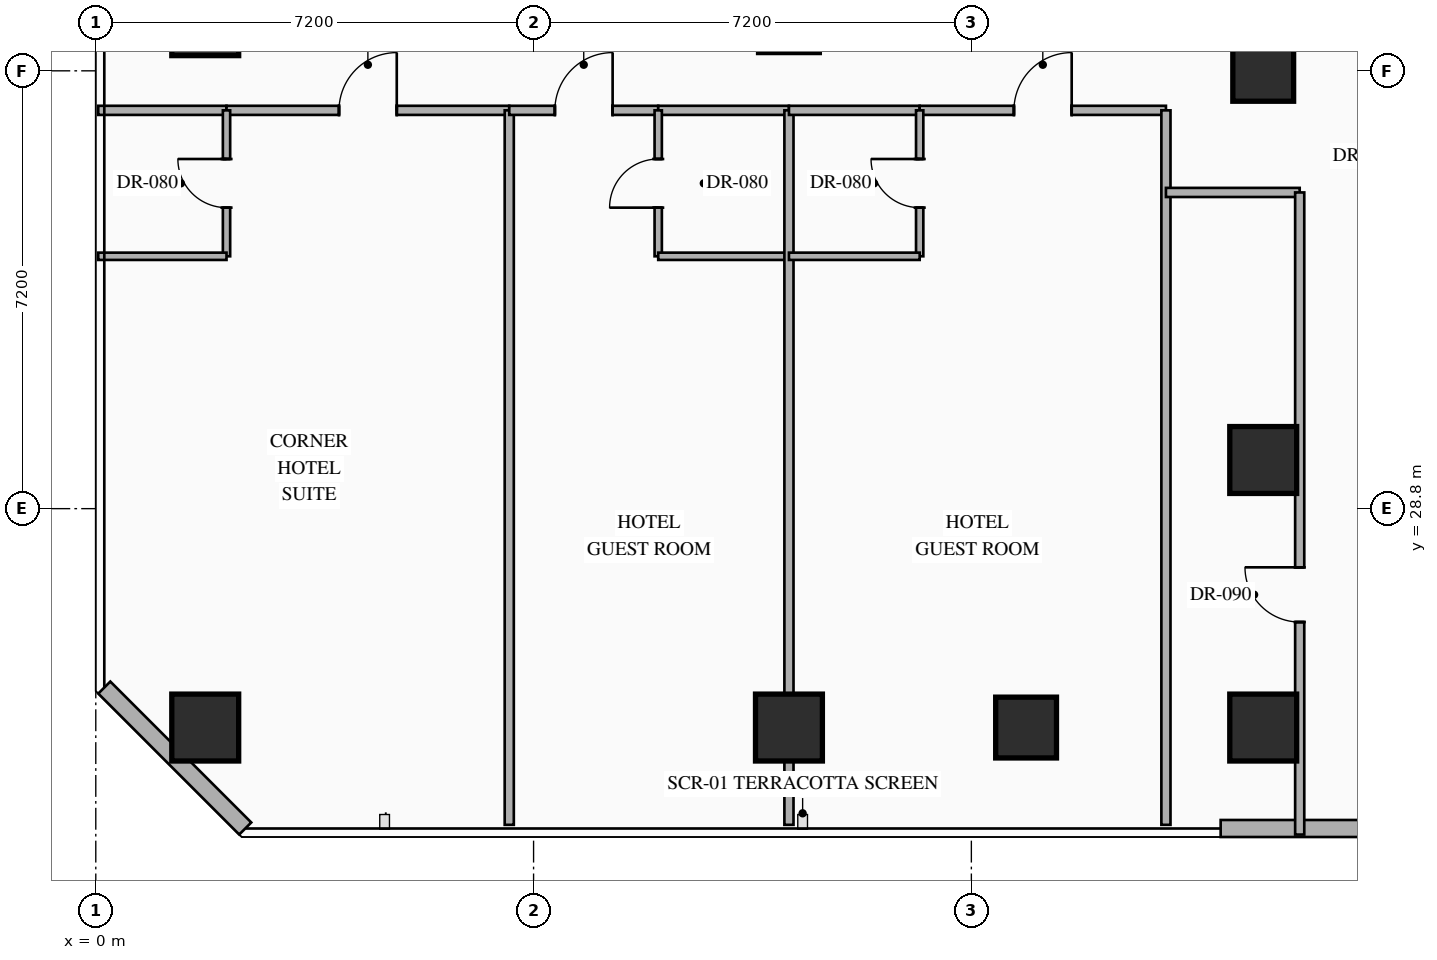
"""IFC4 building model, lengths in metres.
Left out: names, types, materials, properties, quantities, classifications, styles, units other than length and angle.
Written with IfcOpenShell. Run it as: python <this file> out.ifc"""

import sys

from ifc_helpers import new_model, si_unit, direction, frame, frame_2d, origin, origin_2d, place, context, subcontext, project, spatial, rectangle, hollow_rectangle, extrude, element, fill, save


model = new_model("IFC4")
c1 = context("Model", 3, precision=1e-05, world=origin(), true_north=direction((0.0, 1.0)))
c2 = subcontext(c1, "Body", "Model", "MODEL_VIEW")
j1 = project(units=[si_unit("LENGTHUNIT", "METRE"), si_unit("PLANEANGLEUNIT", "RADIAN")], contexts=[c1])
p1 = place(None, origin())
s1 = spatial("IfcSite", under=j1, at=p1, CompositionType="ELEMENT")
p2 = place(p1, origin())
s2 = spatial("IfcBuilding", under=s1, at=p2, CompositionType="ELEMENT")
p3 = place(p2, frame((0.0, 0.0, 36.6)))
s3 = spatial("IfcBuildingStorey", under=s2, at=p3, CompositionType="ELEMENT", Elevation=36.6)
for number, where, z_axis, x_axis in (
    (1, (1.8, 25.2, 0.0), (0.0, 0.0, 1.0), (1.0, 0.0, 0.0)),
    (2, (1.8, 36.8, 0.0), (0.0, 0.0, 1.0), (1.0, 0.0, 0.0)),
    (3, (11.4, 25.2, 0.0), (0.0, 0.0, 1.0), (1.0, 0.0, 0.0)),
    (4, (19.2, 25.2, 0.0), (0.0, 0.0, 1.0), (1.0, 0.0, 0.0)),
    (5, (19.2, 29.6, 0.0), (0.0, 0.0, 1.0), (1.0, 0.0, 0.0)),
):
    element("IfcColumn", number, at=place(p3, frame(where, z_axis=z_axis, x_axis=x_axis)), inside=s3, PredefinedType="COLUMN", context=c2, shape_type="SweptSolid", body=[
        extrude(hollow_rectangle(XDim=1.1, YDim=1.1, WallThickness=0.04, at=origin_2d()), origin(), (0.0, 0.0, 1.0), 3.35),
    ])
for number, where, z_axis, x_axis in (
    (6, (19.2, 36.0, 0.0), (0.0, 0.0, 1.0), (1.0, 0.0, 0.0)),
    (7, (15.3, 25.2, 0.0), (0.0, 0.0, 1.0), (1.0, 0.0, 0.0)),
):
    element("IfcColumn", number, at=place(p3, frame(where, z_axis=z_axis, x_axis=x_axis)), inside=s3, PredefinedType="COLUMN", context=c2, shape_type="SweptSolid", body=[
        extrude(hollow_rectangle(XDim=1.0, YDim=1.0, WallThickness=0.038, at=origin_2d()), origin(), (0.0, 0.0, 1.0), 3.35),
    ])
p4 = place(p3, frame((25.247, 23.54, 0.0), z_axis=(0.0, 0.0, 1.0), x_axis=(-1.0, 0.0, 0.0)))
e8 = element("IfcWall", 8, at=p4, inside=s3, PredefinedType="STANDARD", context=c2, shape_type="SweptSolid", body=[
    extrude(rectangle(XDim=6.747, YDim=0.28, at=frame_2d((3.374, 0.0))), origin(), (0.0, 0.0, 1.0), 3.13),
])
p5 = place(p3, frame((2.458, 23.54, 0.0), z_axis=(0.0, 0.0, 1.0), x_axis=(-0.707144017911, 0.707069542501, 0.0)))
e9 = element("IfcWall", 9, at=p5, inside=s3, PredefinedType="STANDARD", context=c2, shape_type="SweptSolid", body=[
    extrude(rectangle(XDim=3.278, YDim=0.28, at=frame_2d((1.639, 0.0))), origin(), (0.0, 0.0, 1.0), 3.13),
])
p6 = place(p3, frame((0.04, 35.35, 0.0), z_axis=(0.0, 0.0, 1.0), x_axis=(1.0, 0.0, 0.0)))
e10 = element("IfcWall", 10, at=p6, inside=s3, PredefinedType="PARTITIONING", context=c2, shape_type="SweptSolid", body=[
    extrude(rectangle(XDim=2.11, YDim=0.15, at=frame_2d((1.055, 0.0))), origin(), (0.0, 0.0, 1.0), 3.13),
])
p7 = place(p3, frame((2.15, 35.35, 0.0), z_axis=(0.0, 0.0, 1.0), x_axis=(1.0, 0.0, 0.0)))
e11 = element("IfcWall", 11, at=p7, inside=s3, PredefinedType="PARTITIONING", context=c2, shape_type="SweptSolid", body=[
    extrude(rectangle(XDim=4.65, YDim=0.15, at=frame_2d((2.325, 0.0))), origin(), (0.0, 0.0, 1.0), 3.13),
])
p8 = place(p7, frame((1.85, 0.0, 0.0)))
e12 = element("IfcOpeningElement", 12, at=p8, cuts=e11, PredefinedType="OPENING", context=c2, shape_type="SweptSolid", body=[
    extrude(rectangle(XDim=0.95, YDim=2.15, at=frame_2d((0.475, 1.075))), frame((0.0, 0.085, 0.0), z_axis=(0.0, -1.0, 0.0), x_axis=(1.0, 0.0, 0.0)), (0.0, 0.0, 1.0), 0.17),
])
p9 = place(p3, frame((2.15, 32.95, 0.0), z_axis=(0.0, 0.0, 1.0), x_axis=(0.0, 1.0, 0.0)))
e13 = element("IfcWall", 13, at=p9, inside=s3, PredefinedType="PARTITIONING", context=c2, shape_type="SweptSolid", body=[
    extrude(rectangle(XDim=2.4, YDim=0.12, at=frame_2d((1.2, 0.0))), origin(), (0.0, 0.0, 1.0), 3.13),
])
p10 = place(p9, frame((0.8, 0.0, 0.0)))
e14 = element("IfcOpeningElement", 14, at=p10, cuts=e13, PredefinedType="OPENING", context=c2, shape_type="SweptSolid", body=[
    extrude(rectangle(XDim=0.8, YDim=2.06, at=frame_2d((0.4, 1.03))), frame((0.0, 0.07, 0.0), z_axis=(0.0, -1.0, 0.0), x_axis=(1.0, 0.0, 0.0)), (0.0, 0.0, 1.0), 0.14),
])
p11 = place(p3, frame((0.04, 32.95, 0.0), z_axis=(0.0, 0.0, 1.0), x_axis=(1.0, 0.0, 0.0)))
e15 = element("IfcWall", 15, at=p11, inside=s3, PredefinedType="PARTITIONING", context=c2, shape_type="SweptSolid", body=[
    extrude(rectangle(XDim=2.11, YDim=0.12, at=frame_2d((1.055, 0.0))), origin(), (0.0, 0.0, 1.0), 3.13),
])
p12 = place(p3, frame((6.8, 23.6, 0.0), z_axis=(0.0, 0.0, 1.0), x_axis=(0.0, 1.0, 0.0)))
e16 = element("IfcWall", 16, at=p12, inside=s3, PredefinedType="PARTITIONING", context=c2, shape_type="SweptSolid", body=[
    extrude(rectangle(XDim=11.75, YDim=0.15, at=frame_2d((5.875, 0.0))), origin(), (0.0, 0.0, 1.0), 3.13),
])
p13 = place(p3, frame((6.8, 35.35, 0.0), z_axis=(0.0, 0.0, 1.0), x_axis=(1.0, 0.0, 0.0)))
e17 = element("IfcWall", 17, at=p13, inside=s3, PredefinedType="PARTITIONING", context=c2, shape_type="SweptSolid", body=[
    extrude(rectangle(XDim=2.45, YDim=0.15, at=frame_2d((1.225, 0.0))), origin(), (0.0, 0.0, 1.0), 3.13),
])
p14 = place(p13, frame((0.75, 0.0, 0.0)))
e18 = element("IfcOpeningElement", 18, at=p14, cuts=e17, PredefinedType="OPENING", context=c2, shape_type="SweptSolid", body=[
    extrude(rectangle(XDim=0.95, YDim=2.15, at=frame_2d((0.475, 1.075))), frame((0.0, 0.085, 0.0), z_axis=(0.0, -1.0, 0.0), x_axis=(1.0, 0.0, 0.0)), (0.0, 0.0, 1.0), 0.17),
])
p15 = place(p3, frame((9.25, 35.35, 0.0), z_axis=(0.0, 0.0, 1.0), x_axis=(1.0, 0.0, 0.0)))
e19 = element("IfcWall", 19, at=p15, inside=s3, PredefinedType="PARTITIONING", context=c2, shape_type="SweptSolid", body=[
    extrude(rectangle(XDim=2.15, YDim=0.15, at=frame_2d((1.075, 0.0))), origin(), (0.0, 0.0, 1.0), 3.13),
])
p16 = place(p3, frame((9.25, 32.95, 0.0), z_axis=(0.0, 0.0, 1.0), x_axis=(0.0, 1.0, 0.0)))
e20 = element("IfcWall", 20, at=p16, inside=s3, PredefinedType="PARTITIONING", context=c2, shape_type="SweptSolid", body=[
    extrude(rectangle(XDim=2.4, YDim=0.12, at=frame_2d((1.2, 0.0))), origin(), (0.0, 0.0, 1.0), 3.13),
])
p17 = place(p16, frame((0.8, 0.0, 0.0)))
e21 = element("IfcOpeningElement", 21, at=p17, cuts=e20, PredefinedType="OPENING", context=c2, shape_type="SweptSolid", body=[
    extrude(rectangle(XDim=0.8, YDim=2.06, at=frame_2d((0.4, 1.03))), frame((0.0, 0.07, 0.0), z_axis=(0.0, -1.0, 0.0), x_axis=(1.0, 0.0, 0.0)), (0.0, 0.0, 1.0), 0.14),
])
p18 = place(p3, frame((9.25, 32.95, 0.0), z_axis=(0.0, 0.0, 1.0), x_axis=(1.0, 0.0, 0.0)))
e22 = element("IfcWall", 22, at=p18, inside=s3, PredefinedType="PARTITIONING", context=c2, shape_type="SweptSolid", body=[
    extrude(rectangle(XDim=2.15, YDim=0.12, at=frame_2d((1.075, 0.0))), origin(), (0.0, 0.0, 1.0), 3.13),
])
p19 = place(p3, frame((11.4, 23.6, 0.0), z_axis=(0.0, 0.0, 1.0), x_axis=(0.0, 1.0, 0.0)))
e23 = element("IfcWall", 23, at=p19, inside=s3, PredefinedType="PARTITIONING", context=c2, shape_type="SweptSolid", body=[
    extrude(rectangle(XDim=11.75, YDim=0.15, at=frame_2d((5.875, 0.0))), origin(), (0.0, 0.0, 1.0), 2.425),
])
p20 = place(p3, frame((11.4, 35.35, 0.0), z_axis=(0.0, 0.0, 1.0), x_axis=(1.0, 0.0, 0.0)))
e24 = element("IfcWall", 24, at=p20, inside=s3, PredefinedType="PARTITIONING", context=c2, shape_type="SweptSolid", body=[
    extrude(rectangle(XDim=2.15, YDim=0.15, at=frame_2d((1.075, 0.0))), origin(), (0.0, 0.0, 1.0), 3.13),
])
p21 = place(p3, frame((13.55, 35.35, 0.0), z_axis=(0.0, 0.0, 1.0), x_axis=(1.0, 0.0, 0.0)))
e25 = element("IfcWall", 25, at=p21, inside=s3, PredefinedType="PARTITIONING", context=c2, shape_type="SweptSolid", body=[
    extrude(rectangle(XDim=4.05, YDim=0.15, at=frame_2d((2.025, 0.0))), origin(), (0.0, 0.0, 1.0), 3.13),
])
p22 = place(p21, frame((1.55, 0.0, 0.0)))
e26 = element("IfcOpeningElement", 26, at=p22, cuts=e25, PredefinedType="OPENING", context=c2, shape_type="SweptSolid", body=[
    extrude(rectangle(XDim=0.95, YDim=2.15, at=frame_2d((0.475, 1.075))), frame((0.0, 0.085, 0.0), z_axis=(0.0, -1.0, 0.0), x_axis=(1.0, 0.0, 0.0)), (0.0, 0.0, 1.0), 0.17),
])
p23 = place(p3, frame((13.55, 32.95, 0.0), z_axis=(0.0, 0.0, 1.0), x_axis=(0.0, 1.0, 0.0)))
e27 = element("IfcWall", 27, at=p23, inside=s3, PredefinedType="PARTITIONING", context=c2, shape_type="SweptSolid", body=[
    extrude(rectangle(XDim=2.4, YDim=0.12, at=frame_2d((1.2, 0.0))), origin(), (0.0, 0.0, 1.0), 3.13),
])
p24 = place(p23, frame((0.8, 0.0, 0.0)))
e28 = element("IfcOpeningElement", 28, at=p24, cuts=e27, PredefinedType="OPENING", context=c2, shape_type="SweptSolid", body=[
    extrude(rectangle(XDim=0.8, YDim=2.06, at=frame_2d((0.4, 1.03))), frame((0.0, 0.07, 0.0), z_axis=(0.0, -1.0, 0.0), x_axis=(1.0, 0.0, 0.0)), (0.0, 0.0, 1.0), 0.14),
])
p25 = place(p3, frame((11.4, 32.95, 0.0), z_axis=(0.0, 0.0, 1.0), x_axis=(1.0, 0.0, 0.0)))
e29 = element("IfcWall", 29, at=p25, inside=s3, PredefinedType="PARTITIONING", context=c2, shape_type="SweptSolid", body=[
    extrude(rectangle(XDim=2.15, YDim=0.12, at=frame_2d((1.075, 0.0))), origin(), (0.0, 0.0, 1.0), 3.13),
])
p26 = place(p3, frame((17.6, 23.6, 0.0), z_axis=(0.0, 0.0, 1.0), x_axis=(0.0, 1.0, 0.0)))
e30 = element("IfcWall", 30, at=p26, inside=s3, PredefinedType="PARTITIONING", context=c2, shape_type="SweptSolid", body=[
    extrude(rectangle(XDim=11.75, YDim=0.15, at=frame_2d((5.875, 0.0))), origin(), (0.0, 0.0, 1.0), 3.13),
])
p27 = place(p3, frame((17.6, 34.0, 0.0), z_axis=(0.0, 0.0, 1.0), x_axis=(1.0, 0.0, 0.0)))
e31 = element("IfcWall", 31, at=p27, inside=s3, PredefinedType="PARTITIONING", context=c2, shape_type="SweptSolid", body=[
    extrude(rectangle(XDim=2.2, YDim=0.15, at=frame_2d((1.1, 0.0))), origin(), (0.0, 0.0, 1.0), 3.13),
])
p28 = place(p3, frame((19.8, 23.44, 0.0), z_axis=(0.0, 0.0, 1.0), x_axis=(0.0, 1.0, 0.0)))
e32 = element("IfcWall", 32, at=p28, inside=s3, PredefinedType="PARTITIONING", context=c2, shape_type="SweptSolid", body=[
    extrude(rectangle(XDim=10.56, YDim=0.15, at=frame_2d((5.28, 0.0))), origin(), (0.0, 0.0, 1.0), 3.13),
])
p29 = place(p28, frame((3.495, 0.0, 0.0)))
e33 = element("IfcOpeningElement", 33, at=p29, cuts=e32, PredefinedType="OPENING", context=c2, shape_type="SweptSolid", body=[
    extrude(rectangle(XDim=0.9, YDim=2.15, at=frame_2d((0.45, 1.075))), frame((0.0, 0.085, 0.0), z_axis=(0.0, -1.0, 0.0), x_axis=(1.0, 0.0, 0.0)), (0.0, 0.0, 1.0), 0.17),
])
p30 = place(p8, origin())
e34 = element("IfcDoor", 34, at=p30, inside=s3, OperationType="SINGLE_SWING_RIGHT", PredefinedType="DOOR", context=c2, shape_type="SweptSolid", body=[
    extrude(rectangle(XDim=0.95, YDim=2.15, at=frame_2d((0.475, 1.075))), frame((0.0, 0.025, 0.0), z_axis=(0.0, -1.0, 0.0), x_axis=(1.0, 0.0, 0.0)), (0.0, 0.0, 1.0), 0.05),
])
fill(e12, e34)
p31 = place(p10, origin())
e35 = element("IfcDoor", 35, at=p31, inside=s3, OperationType="SINGLE_SWING_RIGHT", PredefinedType="DOOR", context=c2, shape_type="SweptSolid", body=[
    extrude(rectangle(XDim=0.8, YDim=2.06, at=frame_2d((0.4, 1.03))), frame((0.0, 0.025, 0.0), z_axis=(0.0, -1.0, 0.0), x_axis=(1.0, 0.0, 0.0)), (0.0, 0.0, 1.0), 0.05),
])
fill(e14, e35)
p32 = place(p14, origin())
e36 = element("IfcDoor", 36, at=p32, inside=s3, OperationType="SINGLE_SWING_RIGHT", PredefinedType="DOOR", context=c2, shape_type="SweptSolid", body=[
    extrude(rectangle(XDim=0.95, YDim=2.15, at=frame_2d((0.475, 1.075))), frame((0.0, 0.025, 0.0), z_axis=(0.0, -1.0, 0.0), x_axis=(1.0, 0.0, 0.0)), (0.0, 0.0, 1.0), 0.05),
])
fill(e18, e36)
p33 = place(p17, origin())
e37 = element("IfcDoor", 37, at=p33, inside=s3, OperationType="SINGLE_SWING_LEFT", PredefinedType="DOOR", context=c2, shape_type="SweptSolid", body=[
    extrude(rectangle(XDim=0.8, YDim=2.06, at=frame_2d((0.4, 1.03))), frame((0.0, 0.025, 0.0), z_axis=(0.0, -1.0, 0.0), x_axis=(1.0, 0.0, 0.0)), (0.0, 0.0, 1.0), 0.05),
])
fill(e21, e37)
p34 = place(p22, origin())
e38 = element("IfcDoor", 38, at=p34, inside=s3, OperationType="SINGLE_SWING_RIGHT", PredefinedType="DOOR", context=c2, shape_type="SweptSolid", body=[
    extrude(rectangle(XDim=0.95, YDim=2.15, at=frame_2d((0.475, 1.075))), frame((0.0, 0.025, 0.0), z_axis=(0.0, -1.0, 0.0), x_axis=(1.0, 0.0, 0.0)), (0.0, 0.0, 1.0), 0.05),
])
fill(e26, e38)
p35 = place(p24, origin())
e39 = element("IfcDoor", 39, at=p35, inside=s3, OperationType="SINGLE_SWING_RIGHT", PredefinedType="DOOR", context=c2, shape_type="SweptSolid", body=[
    extrude(rectangle(XDim=0.8, YDim=2.06, at=frame_2d((0.4, 1.03))), frame((0.0, 0.025, 0.0), z_axis=(0.0, -1.0, 0.0), x_axis=(1.0, 0.0, 0.0)), (0.0, 0.0, 1.0), 0.05),
])
fill(e28, e39)
p36 = place(p29, origin())
e40 = element("IfcDoor", 40, at=p36, inside=s3, OperationType="SINGLE_SWING_RIGHT", PredefinedType="DOOR", context=c2, shape_type="SweptSolid", body=[
    extrude(rectangle(XDim=0.9, YDim=2.15, at=frame_2d((0.45, 1.075))), frame((0.0, 0.025, 0.0), z_axis=(0.0, -1.0, 0.0), x_axis=(1.0, 0.0, 0.0)), (0.0, 0.0, 1.0), 0.05),
])
fill(e33, e40)
save(model, sys.argv[1])
